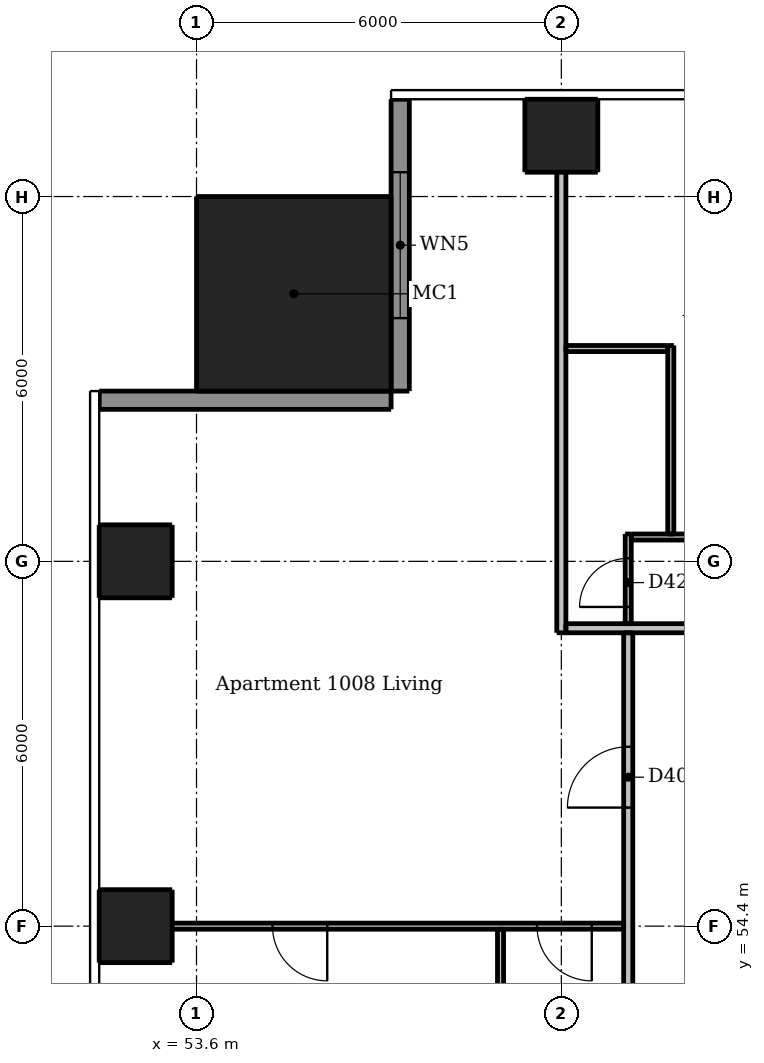
"""IFC4 building model, lengths in metres.
Left out: names, types, materials, properties, quantities, classifications, styles, units other than length and angle.
Written with IfcOpenShell. Run it as: python <this file> out.ifc"""

import sys

from ifc_helpers import new_model, si_unit, direction, frame, frame_2d, origin, origin_2d, place, context, subcontext, project, spatial, rectangle, extrude, element, fill, save


model = new_model("IFC4")
c1 = context("Model", 3, precision=1e-05, world=origin(), true_north=direction((0.0, 1.0)))
c2 = subcontext(c1, "Body", "Model", "MODEL_VIEW")
j1 = project(units=[si_unit("LENGTHUNIT", "METRE"), si_unit("PLANEANGLEUNIT", "RADIAN")], contexts=[c1])
p1 = place(None, origin())
s1 = spatial("IfcSite", under=j1, at=p1, CompositionType="ELEMENT")
p2 = place(p1, origin())
s2 = spatial("IfcBuilding", under=s1, at=p2, CompositionType="ELEMENT")
p3 = place(p2, frame((0.0, 0.0, 40.0)))
s3 = spatial("IfcBuildingStorey", under=s2, at=p3, CompositionType="ELEMENT", Elevation=40.0)
for number, where, z_axis, x_axis in (
    (1, (59.6, 67.4, 0.0), (0.0, 0.0, 1.0), (1.0, 0.0, 0.0)),
    (2, (52.6, 54.4, 0.0), (0.0, 0.0, 1.0), (1.0, 0.0, 0.0)),
    (3, (52.6, 60.4, 0.0), (0.0, 0.0, 1.0), (1.0, 0.0, 0.0)),
):
    element("IfcColumn", number, at=place(p3, frame(where, z_axis=z_axis, x_axis=x_axis)), inside=s3, PredefinedType="COLUMN", context=c2, shape_type="SweptSolid", body=[
        extrude(rectangle(XDim=1.2, YDim=1.2, at=origin_2d()), origin(), (0.0, 0.0, 1.0), 3.05),
    ])
p4 = place(p3, frame((55.2, 64.8, 0.0), z_axis=(0.0, 0.0, 1.0), x_axis=(1.0, 0.0, 0.0)))
e4 = element("IfcColumn", 4, at=p4, inside=s3, PredefinedType="COLUMN", context=c2, shape_type="SweptSolid", body=[
    extrude(rectangle(XDim=3.2, YDim=3.2, at=origin_2d()), origin(), (0.0, 0.0, 1.0), 3.3),
])
p5 = place(p3, frame((56.95, 68.0, 0.0), z_axis=(0.0, 0.0, 1.0), x_axis=(0.0, -1.0, 0.0)))
e5 = element("IfcWall", 5, at=p5, inside=s3, PredefinedType="SOLIDWALL", context=c2, shape_type="SweptSolid", body=[
    extrude(rectangle(XDim=4.8, YDim=0.3, at=frame_2d((2.4, 0.0))), origin(), (0.0, 0.0, 1.0), 3.05),
])
p6 = place(p5, frame((1.2, 0.0, 0.15)))
e6 = element("IfcOpeningElement", 6, at=p6, cuts=e5, PredefinedType="OPENING", context=c2, shape_type="SweptSolid", body=[
    extrude(rectangle(XDim=2.4, YDim=2.1, at=frame_2d((1.2, 1.05))), frame((0.0, 0.16, 0.0), z_axis=(0.0, -1.0, 0.0), x_axis=(1.0, 0.0, 0.0)), (0.0, 0.0, 1.0), 0.32),
])
p7 = place(p3, frame((56.8, 63.05, 0.0), z_axis=(0.0, 0.0, 1.0), x_axis=(-1.0, 0.0, 0.0)))
e7 = element("IfcWall", 7, at=p7, inside=s3, PredefinedType="SOLIDWALL", context=c2, shape_type="SweptSolid", body=[
    extrude(rectangle(XDim=4.8, YDim=0.3, at=frame_2d((2.4, 0.0))), origin(), (0.0, 0.0, 1.0), 3.05),
])
p8 = place(p3, frame((58.6, 54.35, 0.0), z_axis=(0.0, 0.0, 1.0), x_axis=(0.0, -1.0, 0.0)))
e8 = element("IfcWall", 8, at=p8, inside=s3, PredefinedType="PARTITIONING", context=c2, shape_type="SweptSolid", body=[
    extrude(rectangle(XDim=5.875, YDim=0.1, at=frame_2d((2.938, 0.0))), origin(), (0.0, 0.0, 1.0), 3.05),
])
p9 = place(p8, frame((3.75, 0.0, 0.0)))
e9 = element("IfcOpeningElement", 9, at=p9, cuts=e8, PredefinedType="OPENING", context=c2, shape_type="SweptSolid", body=[
    extrude(rectangle(XDim=0.8, YDim=2.1, at=frame_2d((0.4, 1.05))), frame((0.0, 0.06, 0.0), z_axis=(0.0, -1.0, 0.0), x_axis=(1.0, 0.0, 0.0)), (0.0, 0.0, 1.0), 0.12),
])
p10 = place(p3, frame((60.7, 59.375, 0.0), z_axis=(0.0, 0.0, 1.0), x_axis=(0.0, 1.0, 0.0)))
e10 = element("IfcWall", 10, at=p10, inside=s3, PredefinedType="PARTITIONING", context=c2, shape_type="SweptSolid", body=[
    extrude(rectangle(XDim=1.475, YDim=0.1, at=frame_2d((0.738, 0.0))), origin(), (0.0, 0.0, 1.0), 3.05),
])
p11 = place(p10, frame((0.275, 0.0, 0.0)))
e11 = element("IfcOpeningElement", 11, at=p11, cuts=e10, PredefinedType="OPENING", context=c2, shape_type="SweptSolid", body=[
    extrude(rectangle(XDim=0.8, YDim=2.1, at=frame_2d((0.4, 1.05))), frame((0.0, 0.06, 0.0), z_axis=(0.0, -1.0, 0.0), x_axis=(1.0, 0.0, 0.0)), (0.0, 0.0, 1.0), 0.12),
])
p12 = place(p3, frame((61.4, 60.85, 0.0), z_axis=(0.0, 0.0, 1.0), x_axis=(0.0, 1.0, 0.0)))
e12 = element("IfcWall", 12, at=p12, inside=s3, PredefinedType="PARTITIONING", context=c2, shape_type="SweptSolid", body=[
    extrude(rectangle(XDim=3.1, YDim=0.1, at=frame_2d((1.55, 0.0))), origin(), (0.0, 0.0, 1.0), 3.05),
])
p13 = place(p3, frame((59.675, 63.9, 0.0), z_axis=(0.0, 0.0, 1.0), x_axis=(1.0, 0.0, 0.0)))
e13 = element("IfcWall", 13, at=p13, inside=s3, PredefinedType="PARTITIONING", context=c2, shape_type="SweptSolid", body=[
    extrude(rectangle(XDim=1.675, YDim=0.1, at=frame_2d((0.837, 0.0))), origin(), (0.0, 0.0, 1.0), 3.05),
])
p14 = place(p3, frame((60.75, 60.8, 0.0), z_axis=(0.0, 0.0, 1.0), x_axis=(1.0, 0.0, 0.0)))
e14 = element("IfcWall", 14, at=p14, inside=s3, PredefinedType="PARTITIONING", context=c2, shape_type="SweptSolid", body=[
    extrude(rectangle(XDim=16.775, YDim=0.1, at=frame_2d((8.387, 0.0))), origin(), (0.0, 0.0, 1.0), 3.05),
])
p15 = place(p14, frame((3.8, 0.0, 0.0)))
e15 = element("IfcOpeningElement", 15, at=p15, cuts=e14, PredefinedType="OPENING", context=c2, shape_type="SweptSolid", body=[
    extrude(rectangle(XDim=0.9, YDim=2.1, at=frame_2d((0.45, 1.05))), frame((0.0, 0.06, 0.0), z_axis=(0.0, -1.0, 0.0), x_axis=(1.0, 0.0, 0.0)), (0.0, 0.0, 1.0), 0.12),
])
p16 = place(p14, frame((8.9, 0.0, 0.0)))
e16 = element("IfcOpeningElement", 16, at=p16, cuts=e14, PredefinedType="OPENING", context=c2, shape_type="SweptSolid", body=[
    extrude(rectangle(XDim=0.9, YDim=2.1, at=frame_2d((0.45, 1.05))), frame((0.0, 0.06, 0.0), z_axis=(0.0, -1.0, 0.0), x_axis=(1.0, 0.0, 0.0)), (0.0, 0.0, 1.0), 0.12),
])
p17 = place(p14, frame((14.6, 0.0, 0.0)))
e17 = element("IfcOpeningElement", 17, at=p17, cuts=e14, PredefinedType="OPENING", context=c2, shape_type="SweptSolid", body=[
    extrude(rectangle(XDim=0.9, YDim=2.1, at=frame_2d((0.45, 1.05))), frame((0.0, 0.06, 0.0), z_axis=(0.0, -1.0, 0.0), x_axis=(1.0, 0.0, 0.0)), (0.0, 0.0, 1.0), 0.12),
])
p18 = place(p14, frame((11.65, 0.0, 0.0)))
e18 = element("IfcOpeningElement", 18, at=p18, cuts=e14, PredefinedType="OPENING", context=c2, shape_type="SweptSolid", body=[
    extrude(rectangle(XDim=0.8, YDim=2.1, at=frame_2d((0.4, 1.05))), frame((0.0, 0.06, 0.0), z_axis=(0.0, -1.0, 0.0), x_axis=(1.0, 0.0, 0.0)), (0.0, 0.0, 1.0), 0.12),
])
p19 = place(p3, frame((60.625, 54.4, 0.0), z_axis=(0.0, 0.0, 1.0), x_axis=(-1.0, 0.0, 0.0)))
e19 = element("IfcWall", 19, at=p19, inside=s3, PredefinedType="PARTITIONING", context=c2, shape_type="SweptSolid", body=[
    extrude(rectangle(XDim=8.625, YDim=0.1, at=frame_2d((4.312, 0.0))), origin(), (0.0, 0.0, 1.0), 2.516),
])
p20 = place(p19, frame((0.525, 0.0, 0.0)))
e20 = element("IfcOpeningElement", 20, at=p20, cuts=e19, PredefinedType="OPENING", context=c2, shape_type="SweptSolid", body=[
    extrude(rectangle(XDim=0.9, YDim=2.1, at=frame_2d((0.45, 1.05))), frame((0.0, 0.06, 0.0), z_axis=(0.0, -1.0, 0.0), x_axis=(1.0, 0.0, 0.0)), (0.0, 0.0, 1.0), 0.12),
])
p21 = place(p19, frame((4.875, 0.0, 0.0)))
e21 = element("IfcOpeningElement", 21, at=p21, cuts=e19, PredefinedType="OPENING", context=c2, shape_type="SweptSolid", body=[
    extrude(rectangle(XDim=0.9, YDim=2.1, at=frame_2d((0.45, 1.05))), frame((0.0, 0.06, 0.0), z_axis=(0.0, -1.0, 0.0), x_axis=(1.0, 0.0, 0.0)), (0.0, 0.0, 1.0), 0.12),
])
p22 = place(p3, frame((59.6, 59.225, 0.0), z_axis=(0.0, 0.0, 1.0), x_axis=(0.0, 1.0, 0.0)))
e22 = element("IfcWall", 22, at=p22, inside=s3, PredefinedType="PARTITIONING", context=c2, shape_type="SweptSolid", body=[
    extrude(rectangle(XDim=8.775, YDim=0.15, at=frame_2d((4.387, 0.0))), origin(), (0.0, 0.0, 1.0), 2.51),
])
p23 = place(p3, frame((60.7, 30.325, 0.0), z_axis=(0.0, 0.0, 1.0), x_axis=(0.0, 1.0, 0.0)))
e23 = element("IfcWall", 23, at=p23, inside=s3, PredefinedType="PARTITIONING", context=c2, shape_type="SweptSolid", body=[
    extrude(rectangle(XDim=28.9, YDim=0.15, at=frame_2d((14.45, 0.0))), origin(), (0.0, 0.0, 1.0), 3.05),
])
p24 = place(p23, frame((9.225, 0.0, 0.0)))
e24 = element("IfcOpeningElement", 24, at=p24, cuts=e23, PredefinedType="OPENING", context=c2, shape_type="SweptSolid", body=[
    extrude(rectangle(XDim=1.0, YDim=2.1, at=frame_2d((0.5, 1.05))), frame((0.0, 0.085, 0.0), z_axis=(0.0, -1.0, 0.0), x_axis=(1.0, 0.0, 0.0)), (0.0, 0.0, 1.0), 0.17),
])
p25 = place(p23, frame((26.025, 0.0, 0.0)))
e25 = element("IfcOpeningElement", 25, at=p25, cuts=e23, PredefinedType="OPENING", context=c2, shape_type="SweptSolid", body=[
    extrude(rectangle(XDim=1.0, YDim=2.1, at=frame_2d((0.5, 1.05))), frame((0.0, 0.085, 0.0), z_axis=(0.0, -1.0, 0.0), x_axis=(1.0, 0.0, 0.0)), (0.0, 0.0, 1.0), 0.17),
])
p26 = place(p3, frame((59.675, 59.3, 0.0), z_axis=(0.0, 0.0, 1.0), x_axis=(1.0, 0.0, 0.0)))
e26 = element("IfcWall", 26, at=p26, inside=s3, PredefinedType="PARTITIONING", context=c2, shape_type="SweptSolid", body=[
    extrude(rectangle(XDim=28.55, YDim=0.15, at=frame_2d((14.275, 0.0))), origin(), (0.0, 0.0, 1.0), 3.05),
])
p27 = place(p26, frame((8.975, 0.0, 0.0)))
e27 = element("IfcOpeningElement", 27, at=p27, cuts=e26, PredefinedType="OPENING", context=c2, shape_type="SweptSolid", body=[
    extrude(rectangle(XDim=1.0, YDim=2.1, at=frame_2d((0.5, 1.05))), frame((0.0, 0.085, 0.0), z_axis=(0.0, -1.0, 0.0), x_axis=(1.0, 0.0, 0.0)), (0.0, 0.0, 1.0), 0.17),
])
p28 = place(p26, frame((25.775, 0.0, 0.0)))
e28 = element("IfcOpeningElement", 28, at=p28, cuts=e26, PredefinedType="OPENING", context=c2, shape_type="SweptSolid", body=[
    extrude(rectangle(XDim=1.0, YDim=2.1, at=frame_2d((0.5, 1.05))), frame((0.0, 0.085, 0.0), z_axis=(0.0, -1.0, 0.0), x_axis=(1.0, 0.0, 0.0)), (0.0, 0.0, 1.0), 0.17),
])
p29 = place(p6, origin())
e29 = element("IfcWindow", 29, at=p29, inside=s3, PartitioningType="DOUBLE_PANEL_VERTICAL", PredefinedType="WINDOW", context=c2, shape_type="SweptSolid", body=[
    extrude(rectangle(XDim=2.4, YDim=2.1, at=frame_2d((1.2, 1.05))), frame((0.0, 0.03, 0.0), z_axis=(0.0, -1.0, 0.0), x_axis=(1.0, 0.0, 0.0)), (0.0, 0.0, 1.0), 0.06),
])
fill(e6, e29)
p30 = place(p11, origin())
e30 = element("IfcDoor", 30, at=p30, inside=s3, OperationType="SINGLE_SWING_LEFT", PredefinedType="DOOR", context=c2, shape_type="SweptSolid", body=[
    extrude(rectangle(XDim=0.8, YDim=2.1, at=frame_2d((0.4, 1.05))), frame((0.0, 0.025, 0.0), z_axis=(0.0, -1.0, 0.0), x_axis=(1.0, 0.0, 0.0)), (0.0, 0.0, 1.0), 0.05),
])
fill(e11, e30)
p31 = place(p25, origin())
e31 = element("IfcDoor", 31, at=p31, inside=s3, OperationType="SINGLE_SWING_LEFT", PredefinedType="DOOR", context=c2, shape_type="SweptSolid", body=[
    extrude(rectangle(XDim=1.0, YDim=2.1, at=frame_2d((0.5, 1.05))), frame((0.0, 0.025, 0.0), z_axis=(0.0, -1.0, 0.0), x_axis=(1.0, 0.0, 0.0)), (0.0, 0.0, 1.0), 0.05),
])
fill(e25, e31)
p32 = place(p20, origin())
e32 = element("IfcDoor", 32, at=p32, inside=s3, OperationType="SINGLE_SWING_LEFT", PredefinedType="DOOR", context=c2, shape_type="SweptSolid", body=[
    extrude(rectangle(XDim=0.9, YDim=2.1, at=frame_2d((0.45, 1.05))), frame((0.0, 0.025, 0.0), z_axis=(0.0, -1.0, 0.0), x_axis=(1.0, 0.0, 0.0)), (0.0, 0.0, 1.0), 0.05),
])
fill(e20, e32)
p33 = place(p21, origin())
e33 = element("IfcDoor", 33, at=p33, inside=s3, OperationType="SINGLE_SWING_LEFT", PredefinedType="DOOR", context=c2, shape_type="SweptSolid", body=[
    extrude(rectangle(XDim=0.9, YDim=2.1, at=frame_2d((0.45, 1.05))), frame((0.0, 0.025, 0.0), z_axis=(0.0, -1.0, 0.0), x_axis=(1.0, 0.0, 0.0)), (0.0, 0.0, 1.0), 0.05),
])
fill(e21, e33)
save(model, sys.argv[1])
